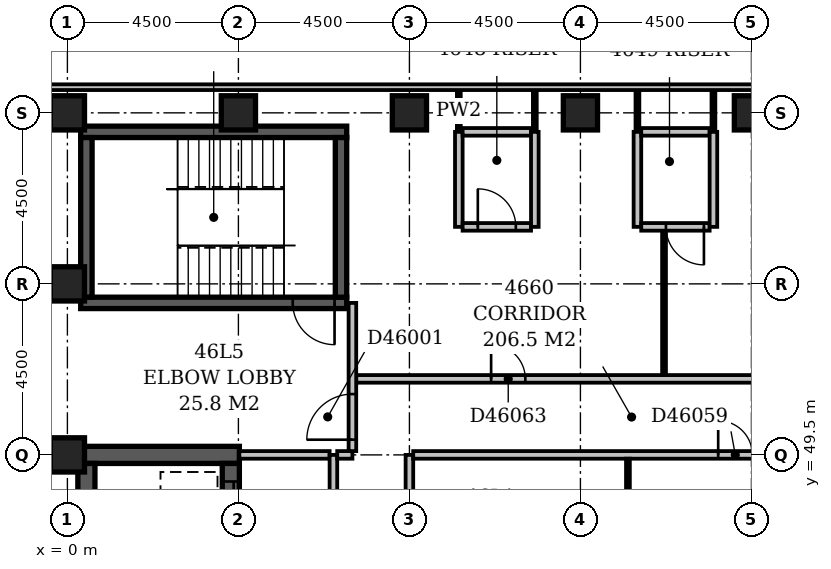
"""IFC4 building model, lengths in metres.
Left out: names, types, materials, properties, quantities, classifications, styles, units other than length and angle.
Written with IfcOpenShell. Run it as: python <this file> out.ifc"""

import sys

from ifc_helpers import new_model, si_unit, direction, frame, frame_2d, origin, origin_2d, place, context, subcontext, project, spatial, rectangle, extrude, element, fill, save


model = new_model("IFC4")
c1 = context("Model", 3, precision=1e-05, world=origin(), true_north=direction((0.0, 1.0)))
c2 = subcontext(c1, "Body", "Model", "MODEL_VIEW")
j1 = project(units=[si_unit("LENGTHUNIT", "METRE"), si_unit("PLANEANGLEUNIT", "RADIAN")], contexts=[c1])
p1 = place(None, origin())
s1 = spatial("IfcSite", under=j1, at=p1, CompositionType="ELEMENT")
p2 = place(p1, origin())
s2 = spatial("IfcBuilding", under=s1, at=p2, CompositionType="ELEMENT")
p3 = place(p2, frame((0.0, 0.0, 182.6)))
s3 = spatial("IfcBuildingStorey", under=s2, at=p3, CompositionType="ELEMENT", Elevation=182.6)
p4 = place(p3, frame((0.275, 49.5, -0.3), z_axis=(0.0, 0.0, 1.0), x_axis=(1.0, 0.0, 0.0)))
e1 = element("IfcWall", 1, at=p4, inside=s3, PredefinedType="SHEAR", context=c2, shape_type="SweptSolid", body=[
    extrude(rectangle(XDim=4.25, YDim=0.45, at=frame_2d((2.125, 0.0))), origin(), (0.0, 0.0, 1.0), 3.55),
])
p5 = place(p3, frame((0.35, 53.5, -0.3), z_axis=(0.0, 0.0, 1.0), x_axis=(1.0, 0.0, 0.0)))
e2 = element("IfcWall", 2, at=p5, inside=s3, PredefinedType="SHEAR", context=c2, shape_type="SweptSolid", body=[
    extrude(rectangle(XDim=7.0, YDim=0.3, at=frame_2d((3.5, 0.0))), origin(), (0.0, 0.0, 1.0), 3.55),
])
p6 = place(p5, frame((5.58, 0.0, 0.3)))
e3 = element("IfcOpeningElement", 3, at=p6, cuts=e2, PredefinedType="OPENING", context=c2, shape_type="SweptSolid", body=[
    extrude(rectangle(XDim=1.1, YDim=2.1, at=frame_2d((0.55, 1.05))), frame((0.0, 0.162, 0.0), z_axis=(0.0, -1.0, 0.0), x_axis=(1.0, 0.0, 0.0)), (0.0, 0.0, 1.0), 0.324),
])
p7 = place(p3, frame((0.35, 58.0, -0.3), z_axis=(0.0, 0.0, 1.0), x_axis=(1.0, 0.0, 0.0)))
e4 = element("IfcWall", 4, at=p7, inside=s3, PredefinedType="SHEAR", context=c2, shape_type="SweptSolid", body=[
    extrude(rectangle(XDim=7.0, YDim=0.3, at=frame_2d((3.5, 0.0))), origin(), (0.0, 0.0, 1.0), 3.55),
])
p8 = place(p3, frame((0.5, 27.15, -0.3), z_axis=(0.0, 0.0, 1.0), x_axis=(0.0, 1.0, 0.0)))
e5 = element("IfcWall", 5, at=p8, inside=s3, PredefinedType="SHEAR", context=c2, shape_type="SweptSolid", body=[
    extrude(rectangle(XDim=22.125, YDim=0.45, at=frame_2d((11.062, 0.0))), origin(), (0.0, 0.0, 1.0), 3.55),
])
p9 = place(p3, frame((0.5, 53.65, -0.3), z_axis=(0.0, 0.0, 1.0), x_axis=(0.0, 1.0, 0.0)))
e6 = element("IfcWall", 6, at=p9, inside=s3, PredefinedType="SHEAR", context=c2, shape_type="SweptSolid", body=[
    extrude(rectangle(XDim=4.2, YDim=0.3, at=frame_2d((2.1, 0.0))), origin(), (0.0, 0.0, 1.0), 3.55),
])
p10 = place(p3, frame((4.3, 27.15, -0.3), z_axis=(0.0, 0.0, 1.0), x_axis=(0.0, 1.0, 0.0)))
e7 = element("IfcWall", 7, at=p10, inside=s3, PredefinedType="SHEAR", context=c2, shape_type="SweptSolid", body=[
    extrude(rectangle(XDim=22.125, YDim=0.45, at=frame_2d((11.062, 0.0))), origin(), (0.0, 0.0, 1.0), 3.55),
])
p11 = place(p10, frame((3.05, 0.0, 0.3)))
e8 = element("IfcOpeningElement", 8, at=p11, cuts=e7, PredefinedType="OPENING", context=c2, shape_type="SweptSolid", body=[
    extrude(rectangle(XDim=1.1, YDim=2.1, at=frame_2d((0.55, 1.05))), frame((0.0, 0.237, 0.0), z_axis=(0.0, -1.0, 0.0), x_axis=(1.0, 0.0, 0.0)), (0.0, 0.0, 1.0), 0.474),
])
p12 = place(p10, frame((0.55, 0.0, 0.3)))
e9 = element("IfcOpeningElement", 9, at=p12, cuts=e7, PredefinedType="OPENING", context=c2, shape_type="SweptSolid", body=[
    extrude(rectangle(XDim=1.1, YDim=2.1, at=frame_2d((0.55, 1.05))), frame((0.0, 0.237, 0.0), z_axis=(0.0, -1.0, 0.0), x_axis=(1.0, 0.0, 0.0)), (0.0, 0.0, 1.0), 0.474),
])
p13 = place(p10, frame((20.55, 0.0, 0.3)))
e10 = element("IfcOpeningElement", 10, at=p13, cuts=e7, PredefinedType="OPENING", context=c2, shape_type="SweptSolid", body=[
    extrude(rectangle(XDim=1.1, YDim=2.1, at=frame_2d((0.55, 1.05))), frame((0.0, 0.237, 0.0), z_axis=(0.0, -1.0, 0.0), x_axis=(1.0, 0.0, 0.0)), (0.0, 0.0, 1.0), 0.474),
])
p14 = place(p10, frame((18.05, 0.0, 0.3)))
e11 = element("IfcOpeningElement", 11, at=p14, cuts=e7, PredefinedType="OPENING", context=c2, shape_type="SweptSolid", body=[
    extrude(rectangle(XDim=1.1, YDim=2.1, at=frame_2d((0.55, 1.05))), frame((0.0, 0.237, 0.0), z_axis=(0.0, -1.0, 0.0), x_axis=(1.0, 0.0, 0.0)), (0.0, 0.0, 1.0), 0.474),
])
p15 = place(p10, frame((15.55, 0.0, 0.3)))
e12 = element("IfcOpeningElement", 12, at=p15, cuts=e7, PredefinedType="OPENING", context=c2, shape_type="SweptSolid", body=[
    extrude(rectangle(XDim=1.1, YDim=2.1, at=frame_2d((0.55, 1.05))), frame((0.0, 0.237, 0.0), z_axis=(0.0, -1.0, 0.0), x_axis=(1.0, 0.0, 0.0)), (0.0, 0.0, 1.0), 0.474),
])
p16 = place(p10, frame((13.05, 0.0, 0.3)))
e13 = element("IfcOpeningElement", 13, at=p16, cuts=e7, PredefinedType="OPENING", context=c2, shape_type="SweptSolid", body=[
    extrude(rectangle(XDim=1.1, YDim=2.1, at=frame_2d((0.55, 1.05))), frame((0.0, 0.237, 0.0), z_axis=(0.0, -1.0, 0.0), x_axis=(1.0, 0.0, 0.0)), (0.0, 0.0, 1.0), 0.474),
])
p17 = place(p10, frame((10.55, 0.0, 0.3)))
e14 = element("IfcOpeningElement", 14, at=p17, cuts=e7, PredefinedType="OPENING", context=c2, shape_type="SweptSolid", body=[
    extrude(rectangle(XDim=1.1, YDim=2.1, at=frame_2d((0.55, 1.05))), frame((0.0, 0.237, 0.0), z_axis=(0.0, -1.0, 0.0), x_axis=(1.0, 0.0, 0.0)), (0.0, 0.0, 1.0), 0.474),
])
p18 = place(p10, frame((8.05, 0.0, 0.3)))
e15 = element("IfcOpeningElement", 15, at=p18, cuts=e7, PredefinedType="OPENING", context=c2, shape_type="SweptSolid", body=[
    extrude(rectangle(XDim=1.1, YDim=2.1, at=frame_2d((0.55, 1.05))), frame((0.0, 0.237, 0.0), z_axis=(0.0, -1.0, 0.0), x_axis=(1.0, 0.0, 0.0)), (0.0, 0.0, 1.0), 0.474),
])
p19 = place(p10, frame((5.55, 0.0, 0.3)))
e16 = element("IfcOpeningElement", 16, at=p19, cuts=e7, PredefinedType="OPENING", context=c2, shape_type="SweptSolid", body=[
    extrude(rectangle(XDim=1.1, YDim=2.1, at=frame_2d((0.55, 1.05))), frame((0.0, 0.237, 0.0), z_axis=(0.0, -1.0, 0.0), x_axis=(1.0, 0.0, 0.0)), (0.0, 0.0, 1.0), 0.474),
])
p20 = place(p3, frame((7.2, 53.65, -0.3), z_axis=(0.0, 0.0, 1.0), x_axis=(0.0, 1.0, 0.0)))
e17 = element("IfcWall", 17, at=p20, inside=s3, PredefinedType="SHEAR", context=c2, shape_type="SweptSolid", body=[
    extrude(rectangle(XDim=4.2, YDim=0.3, at=frame_2d((2.1, 0.0))), origin(), (0.0, 0.0, 1.0), 3.55),
])
for number, where, z_axis, x_axis in (
    (18, (0.0, 49.5, -0.3), (0.0, 0.0, 1.0), (1.0, 0.0, 0.0)),
    (19, (0.0, 54.0, -0.3), (0.0, 0.0, 1.0), (1.0, 0.0, 0.0)),
    (20, (0.0, 58.5, -0.3), (0.0, 0.0, 1.0), (1.0, 0.0, 0.0)),
    (21, (4.5, 58.5, -0.3), (0.0, 0.0, 1.0), (1.0, 0.0, 0.0)),
    (22, (9.0, 58.5, -0.3), (0.0, 0.0, 1.0), (1.0, 0.0, 0.0)),
    (23, (13.5, 58.5, -0.3), (0.0, 0.0, 1.0), (1.0, 0.0, 0.0)),
    (24, (18.0, 58.5, -0.3), (0.0, 0.0, 1.0), (1.0, 0.0, 0.0)),
):
    element("IfcColumn", number, at=place(p3, frame(where, z_axis=z_axis, x_axis=x_axis)), inside=s3, PredefinedType="COLUMN", context=c2, shape_type="SweptSolid", body=[
        extrude(rectangle(XDim=0.9, YDim=0.9, at=origin_2d()), origin(), (0.0, 0.0, 1.0), 3.55),
    ])
p21 = place(p3, frame((68.1, 59.175, 0.0), z_axis=(0.0, 0.0, 1.0), x_axis=(-1.0, 0.0, 0.0)))
e25 = element("IfcWall", 25, at=p21, inside=s3, PredefinedType="STANDARD", context=c2, shape_type="SweptSolid", body=[
    extrude(rectangle(XDim=68.85, YDim=0.15, at=frame_2d((34.425, 0.0))), origin(), (0.0, 0.0, 1.0), 2.7),
])
p22 = place(p3, frame((7.0, 34.6, 0.0), z_axis=(0.0, 0.0, 1.0), x_axis=(0.0, 1.0, 0.0)))
e26 = element("IfcWall", 26, at=p22, inside=s3, PredefinedType="PARTITIONING", context=c2, shape_type="SweptSolid", body=[
    extrude(rectangle(XDim=14.9, YDim=0.2, at=frame_2d((7.45, 0.0))), origin(), (0.0, 0.0, 1.0), 3.25),
])
p23 = place(p22, frame((2.8, 0.0, 0.0)))
e27 = element("IfcOpeningElement", 27, at=p23, cuts=e26, PredefinedType="OPENING", context=c2, shape_type="SweptSolid", body=[
    extrude(rectangle(XDim=1.2, YDim=2.1, at=frame_2d((0.6, 1.05))), frame((0.0, 0.112, 0.0), z_axis=(0.0, -1.0, 0.0), x_axis=(1.0, 0.0, 0.0)), (0.0, 0.0, 1.0), 0.224),
])
p24 = place(p22, frame((9.8, 0.0, 0.0)))
e28 = element("IfcOpeningElement", 28, at=p24, cuts=e26, PredefinedType="OPENING", context=c2, shape_type="SweptSolid", body=[
    extrude(rectangle(XDim=1.2, YDim=2.1, at=frame_2d((0.6, 1.05))), frame((0.0, 0.112, 0.0), z_axis=(0.0, -1.0, 0.0), x_axis=(1.0, 0.0, 0.0)), (0.0, 0.0, 1.0), 0.224),
])
p25 = place(p3, frame((4.525, 49.5, 0.0), z_axis=(0.0, 0.0, 1.0), x_axis=(1.0, 0.0, 0.0)))
e29 = element("IfcWall", 29, at=p25, inside=s3, PredefinedType="PARTITIONING", context=c2, shape_type="SweptSolid", body=[
    extrude(rectangle(XDim=2.375, YDim=0.2, at=frame_2d((1.188, 0.0))), origin(), (0.0, 0.0, 1.0), 3.25),
])
p26 = place(p3, frame((7.1, 49.5, 0.0), z_axis=(0.0, 0.0, 1.0), x_axis=(1.0, 0.0, 0.0)))
e30 = element("IfcWall", 30, at=p26, inside=s3, PredefinedType="PARTITIONING", context=c2, shape_type="SweptSolid", body=[
    extrude(rectangle(XDim=0.4, YDim=0.2, at=frame_2d((0.2, 0.0))), origin(), (0.0, 0.0, 1.0), 3.25),
])
p27 = place(p3, frame((7.5, 49.6, 0.0), z_axis=(0.0, 0.0, 1.0), x_axis=(0.0, 1.0, 0.0)))
e31 = element("IfcWall", 31, at=p27, inside=s3, PredefinedType="PARTITIONING", context=c2, shape_type="SweptSolid", body=[
    extrude(rectangle(XDim=3.9, YDim=0.2, at=frame_2d((1.95, 0.0))), origin(), (0.0, 0.0, 1.0), 3.25),
])
p28 = place(p27, frame((0.3, 0.0, 0.0)))
e32 = element("IfcOpeningElement", 32, at=p28, cuts=e31, PredefinedType="OPENING", context=c2, shape_type="SweptSolid", body=[
    extrude(rectangle(XDim=1.2, YDim=2.1, at=frame_2d((0.6, 1.05))), frame((0.0, 0.112, 0.0), z_axis=(0.0, -1.0, 0.0), x_axis=(1.0, 0.0, 0.0)), (0.0, 0.0, 1.0), 0.224),
])
p29 = place(p3, frame((9.0, 38.0, 0.0), z_axis=(0.0, 0.0, 1.0), x_axis=(0.0, 1.0, 0.0)))
e33 = element("IfcWall", 33, at=p29, inside=s3, PredefinedType="PARTITIONING", context=c2, shape_type="SweptSolid", body=[
    extrude(rectangle(XDim=11.5, YDim=0.2, at=frame_2d((5.75, 0.0))), origin(), (0.0, 0.0, 1.0), 3.25),
])
p30 = place(p29, frame((5.25, 0.0, 0.0)))
e34 = element("IfcOpeningElement", 34, at=p30, cuts=e33, PredefinedType="OPENING", context=c2, shape_type="SweptSolid", body=[
    extrude(rectangle(XDim=0.9, YDim=2.1, at=frame_2d((0.45, 1.05))), frame((0.0, 0.112, 0.0), z_axis=(0.0, -1.0, 0.0), x_axis=(1.0, 0.0, 0.0)), (0.0, 0.0, 1.0), 0.224),
])
p31 = place(p3, frame((14.75, 38.1, 0.0), z_axis=(0.0, 0.0, 1.0), x_axis=(0.0, 1.0, 0.0)))
e35 = element("IfcWall", 35, at=p31, inside=s3, PredefinedType="PARTITIONING", context=c2, shape_type="SweptSolid", body=[
    extrude(rectangle(XDim=11.3, YDim=0.1, at=frame_2d((5.65, 0.0))), origin(), (0.0, 0.0, 1.0), 3.25),
])
p32 = place(p3, frame((9.1, 49.5, 0.0), z_axis=(0.0, 0.0, 1.0), x_axis=(1.0, 0.0, 0.0)))
e36 = element("IfcWall", 36, at=p32, inside=s3, PredefinedType="PARTITIONING", context=c2, shape_type="SweptSolid", body=[
    extrude(rectangle(XDim=11.3, YDim=0.2, at=frame_2d((5.65, 0.0))), origin(), (0.0, 0.0, 1.0), 3.25),
])
p33 = place(p32, frame((8.025, 0.0, 0.0)))
e37 = element("IfcOpeningElement", 37, at=p33, cuts=e36, PredefinedType="OPENING", context=c2, shape_type="SweptSolid", body=[
    extrude(rectangle(XDim=0.9, YDim=2.1, at=frame_2d((0.45, 1.05))), frame((0.0, 0.112, 0.0), z_axis=(0.0, -1.0, 0.0), x_axis=(1.0, 0.0, 0.0)), (0.0, 0.0, 1.0), 0.224),
])
p34 = place(p3, frame((7.6, 51.5, 0.0), z_axis=(0.0, 0.0, 1.0), x_axis=(1.0, 0.0, 0.0)))
e38 = element("IfcWall", 38, at=p34, inside=s3, PredefinedType="PARTITIONING", context=c2, shape_type="SweptSolid", body=[
    extrude(rectangle(XDim=15.3, YDim=0.2, at=frame_2d((7.65, 0.0))), origin(), (0.0, 0.0, 1.0), 3.25),
])
p35 = place(p34, frame((3.55, 0.0, 0.0)))
e39 = element("IfcOpeningElement", 39, at=p35, cuts=e38, PredefinedType="OPENING", context=c2, shape_type="SweptSolid", body=[
    extrude(rectangle(XDim=0.9, YDim=2.1, at=frame_2d((0.45, 1.05))), frame((0.0, 0.112, 0.0), z_axis=(0.0, -1.0, 0.0), x_axis=(1.0, 0.0, 0.0)), (0.0, 0.0, 1.0), 0.224),
])
p36 = place(p34, frame((11.3, 0.0, 0.0)))
e40 = element("IfcOpeningElement", 40, at=p36, cuts=e38, PredefinedType="OPENING", context=c2, shape_type="SweptSolid", body=[
    extrude(rectangle(XDim=0.9, YDim=2.1, at=frame_2d((0.45, 1.05))), frame((0.0, 0.112, 0.0), z_axis=(0.0, -1.0, 0.0), x_axis=(1.0, 0.0, 0.0)), (0.0, 0.0, 1.0), 0.224),
])
p37 = place(p3, frame((15.7, 51.6, 0.0), z_axis=(0.0, 0.0, 1.0), x_axis=(0.0, 1.0, 0.0)))
e41 = element("IfcWall", 41, at=p37, inside=s3, PredefinedType="PARTITIONING", context=c2, shape_type="SweptSolid", body=[
    extrude(rectangle(XDim=3.8, YDim=0.1, at=frame_2d((1.9, 0.0))), origin(), (0.0, 0.0, 1.0), 3.25),
])
p38 = place(p3, frame((10.3, 55.5, 0.0), z_axis=(0.0, 0.0, 1.0), x_axis=(0.0, 1.0, 0.0)))
e42 = element("IfcWall", 42, at=p38, inside=s3, PredefinedType="PARTITIONING", context=c2, shape_type="SweptSolid", body=[
    extrude(rectangle(XDim=2.5, YDim=0.2, at=frame_2d((1.25, 0.0))), origin(), (0.0, 0.0, 1.0), 3.25),
])
p39 = place(p3, frame((10.4, 55.5, 0.0), z_axis=(0.0, 0.0, 1.0), x_axis=(1.0, 0.0, 0.0)))
e43 = element("IfcWall", 43, at=p39, inside=s3, PredefinedType="PARTITIONING", context=c2, shape_type="SweptSolid", body=[
    extrude(rectangle(XDim=1.8, YDim=0.2, at=frame_2d((0.9, 0.0))), origin(), (0.0, 0.0, 1.0), 3.25),
])
p40 = place(p39, frame((0.4, 0.0, 0.0)))
e44 = element("IfcOpeningElement", 44, at=p40, cuts=e43, PredefinedType="OPENING", context=c2, shape_type="SweptSolid", body=[
    extrude(rectangle(XDim=1.0, YDim=2.1, at=frame_2d((0.5, 1.05))), frame((0.0, 0.112, 0.0), z_axis=(0.0, -1.0, 0.0), x_axis=(1.0, 0.0, 0.0)), (0.0, 0.0, 1.0), 0.224),
])
for number, where, z_axis, x_axis in (
    (45, (12.3, 55.5, 0.0), (0.0, 0.0, 1.0), (0.0, 1.0, 0.0)),
    (46, (15.0, 55.5, 0.0), (0.0, 0.0, 1.0), (0.0, 1.0, 0.0)),
):
    element("IfcWall", number, at=place(p3, frame(where, z_axis=z_axis, x_axis=x_axis)), inside=s3, PredefinedType="PARTITIONING", context=c2, shape_type="SweptSolid", body=[
        extrude(rectangle(XDim=2.5, YDim=0.2, at=frame_2d((1.25, 0.0))), origin(), (0.0, 0.0, 1.0), 3.25),
    ])
p41 = place(p3, frame((15.1, 55.5, 0.0), z_axis=(0.0, 0.0, 1.0), x_axis=(1.0, 0.0, 0.0)))
e47 = element("IfcWall", 47, at=p41, inside=s3, PredefinedType="PARTITIONING", context=c2, shape_type="SweptSolid", body=[
    extrude(rectangle(XDim=1.8, YDim=0.2, at=frame_2d((0.9, 0.0))), origin(), (0.0, 0.0, 1.0), 3.25),
])
p42 = place(p41, frame((0.65, 0.0, 0.0)))
e48 = element("IfcOpeningElement", 48, at=p42, cuts=e47, PredefinedType="OPENING", context=c2, shape_type="SweptSolid", body=[
    extrude(rectangle(XDim=1.0, YDim=2.1, at=frame_2d((0.5, 1.05))), frame((0.0, 0.112, 0.0), z_axis=(0.0, -1.0, 0.0), x_axis=(1.0, 0.0, 0.0)), (0.0, 0.0, 1.0), 0.224),
])
p43 = place(p3, frame((17.0, 55.5, 0.0), z_axis=(0.0, 0.0, 1.0), x_axis=(0.0, 1.0, 0.0)))
e49 = element("IfcWall", 49, at=p43, inside=s3, PredefinedType="PARTITIONING", context=c2, shape_type="SweptSolid", body=[
    extrude(rectangle(XDim=2.5, YDim=0.2, at=frame_2d((1.25, 0.0))), origin(), (0.0, 0.0, 1.0), 3.25),
])
p44 = place(p3, frame((10.3, 58.0, 0.0), z_axis=(0.0, 0.0, 1.0), x_axis=(0.0, 1.0, 0.0)))
e50 = element("IfcWall", 50, at=p44, inside=s3, PredefinedType="PARTITIONING", context=c2, shape_type="SweptSolid", body=[
    extrude(rectangle(XDim=1.1, YDim=0.1, at=frame_2d((0.55, 0.0))), origin(), (0.0, 0.0, 1.0), 3.25),
])
p45 = place(p3, frame((10.4, 58.0, 0.0), z_axis=(0.0, 0.0, 1.0), x_axis=(1.0, 0.0, 0.0)))
e51 = element("IfcWall", 51, at=p45, inside=s3, PredefinedType="PARTITIONING", context=c2, shape_type="SweptSolid", body=[
    extrude(rectangle(XDim=1.8, YDim=0.2, at=frame_2d((0.9, 0.0))), origin(), (0.0, 0.0, 1.0), 3.25),
])
for number, where, z_axis, x_axis in (
    (52, (12.3, 58.0, 0.0), (0.0, 0.0, 1.0), (0.0, 1.0, 0.0)),
    (53, (15.0, 58.0, 0.0), (0.0, 0.0, 1.0), (0.0, 1.0, 0.0)),
):
    element("IfcWall", number, at=place(p3, frame(where, z_axis=z_axis, x_axis=x_axis)), inside=s3, PredefinedType="PARTITIONING", context=c2, shape_type="SweptSolid", body=[
        extrude(rectangle(XDim=1.1, YDim=0.1, at=frame_2d((0.55, 0.0))), origin(), (0.0, 0.0, 1.0), 3.25),
    ])
p46 = place(p3, frame((15.1, 58.0, 0.0), z_axis=(0.0, 0.0, 1.0), x_axis=(1.0, 0.0, 0.0)))
e54 = element("IfcWall", 54, at=p46, inside=s3, PredefinedType="PARTITIONING", context=c2, shape_type="SweptSolid", body=[
    extrude(rectangle(XDim=1.8, YDim=0.2, at=frame_2d((0.9, 0.0))), origin(), (0.0, 0.0, 1.0), 3.25),
])
p47 = place(p3, frame((17.0, 58.0, 0.0), z_axis=(0.0, 0.0, 1.0), x_axis=(0.0, 1.0, 0.0)))
e55 = element("IfcWall", 55, at=p47, inside=s3, PredefinedType="PARTITIONING", context=c2, shape_type="SweptSolid", body=[
    extrude(rectangle(XDim=1.1, YDim=0.1, at=frame_2d((0.55, 0.0))), origin(), (0.0, 0.0, 1.0), 3.25),
])
p48 = place(p28, origin())
e56 = element("IfcDoor", 56, at=p48, inside=s3, OperationType="SINGLE_SWING_LEFT", PredefinedType="DOOR", context=c2, shape_type="SweptSolid", body=[
    extrude(rectangle(XDim=1.2, YDim=2.1, at=frame_2d((0.6, 1.05))), frame((0.0, 0.025, 0.0), z_axis=(0.0, -1.0, 0.0), x_axis=(1.0, 0.0, 0.0)), (0.0, 0.0, 1.0), 0.05),
])
fill(e32, e56)
p49 = place(p13, origin())
e57 = element("IfcDoor", 57, at=p49, inside=s3, OperationType="SLIDING_TO_LEFT", PredefinedType="DOOR", context=c2, shape_type="SweptSolid", body=[
    extrude(rectangle(XDim=1.1, YDim=2.1, at=frame_2d((0.55, 1.05))), frame((0.0, 0.025, 0.0), z_axis=(0.0, -1.0, 0.0), x_axis=(1.0, 0.0, 0.0)), (0.0, 0.0, 1.0), 0.05),
])
fill(e10, e57)
p50 = place(p6, origin())
e58 = element("IfcDoor", 58, at=p50, inside=s3, OperationType="SINGLE_SWING_RIGHT", PredefinedType="DOOR", context=c2, shape_type="SweptSolid", body=[
    extrude(rectangle(XDim=1.1, YDim=2.1, at=frame_2d((0.55, 1.05))), frame((0.0, 0.025, 0.0), z_axis=(0.0, -1.0, 0.0), x_axis=(1.0, 0.0, 0.0)), (0.0, 0.0, 1.0), 0.05),
])
fill(e3, e58)
p51 = place(p33, origin())
e59 = element("IfcDoor", 59, at=p51, inside=s3, OperationType="SINGLE_SWING_LEFT", PredefinedType="DOOR", context=c2, shape_type="SweptSolid", body=[
    extrude(rectangle(XDim=0.9, YDim=2.1, at=frame_2d((0.45, 1.05))), frame((0.0, 0.025, 0.0), z_axis=(0.0, -1.0, 0.0), x_axis=(1.0, 0.0, 0.0)), (0.0, 0.0, 1.0), 0.05),
])
fill(e37, e59)
p52 = place(p35, origin())
e60 = element("IfcDoor", 60, at=p52, inside=s3, OperationType="SINGLE_SWING_LEFT", PredefinedType="DOOR", context=c2, shape_type="SweptSolid", body=[
    extrude(rectangle(XDim=0.9, YDim=2.1, at=frame_2d((0.45, 1.05))), frame((0.0, 0.025, 0.0), z_axis=(0.0, -1.0, 0.0), x_axis=(1.0, 0.0, 0.0)), (0.0, 0.0, 1.0), 0.05),
])
fill(e39, e60)
p53 = place(p40, origin())
e61 = element("IfcDoor", 61, at=p53, inside=s3, OperationType="SINGLE_SWING_LEFT", PredefinedType="DOOR", context=c2, shape_type="SweptSolid", body=[
    extrude(rectangle(XDim=1.0, YDim=2.1, at=frame_2d((0.5, 1.05))), frame((0.0, 0.025, 0.0), z_axis=(0.0, -1.0, 0.0), x_axis=(1.0, 0.0, 0.0)), (0.0, 0.0, 1.0), 0.05),
])
fill(e44, e61)
p54 = place(p42, origin())
e62 = element("IfcDoor", 62, at=p54, inside=s3, OperationType="SINGLE_SWING_RIGHT", PredefinedType="DOOR", context=c2, shape_type="SweptSolid", body=[
    extrude(rectangle(XDim=1.0, YDim=2.1, at=frame_2d((0.5, 1.05))), frame((0.0, 0.025, 0.0), z_axis=(0.0, -1.0, 0.0), x_axis=(1.0, 0.0, 0.0)), (0.0, 0.0, 1.0), 0.05),
])
fill(e48, e62)
save(model, sys.argv[1])
